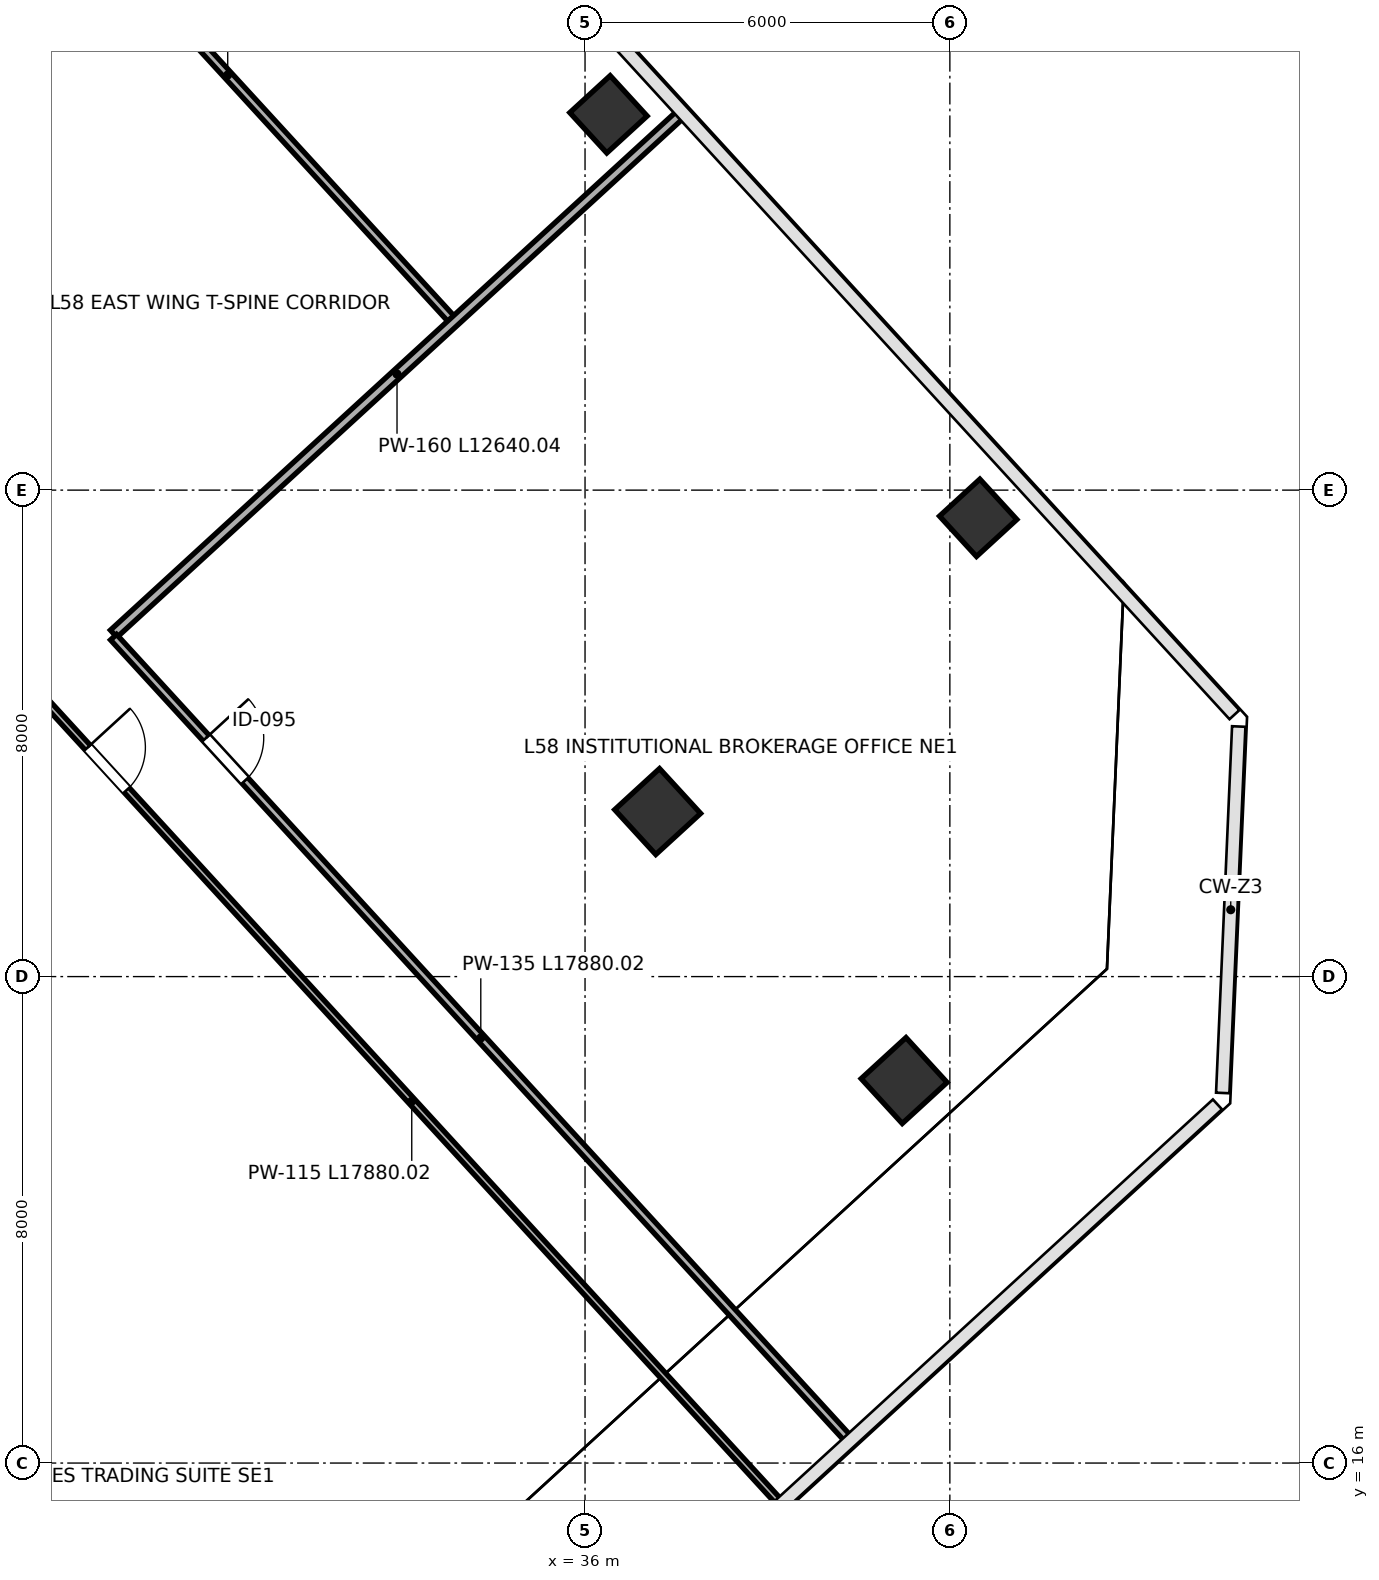
"""IFC4 building model, lengths in metres.
Left out: names, types, materials, properties, quantities, classifications, styles, units other than length and angle.
Written with IfcOpenShell. Run it as: python <this file> out.ifc"""

import sys

from ifc_helpers import new_model, si_unit, direction, frame, frame_2d, origin, origin_2d, place, context, subcontext, project, spatial, rectangle, extrude, source, transform, mapped, element, fill, save


model = new_model("IFC4")
c1 = context("Model", 3, precision=1e-05, world=origin(), true_north=direction((0.0, 1.0)))
c2 = subcontext(c1, "Body", "Model", "MODEL_VIEW")
j1 = project(units=[si_unit("LENGTHUNIT", "METRE"), si_unit("PLANEANGLEUNIT", "RADIAN")], contexts=[c1])
p1 = place(None, origin())
s1 = spatial("IfcSite", under=j1, at=p1, CompositionType="ELEMENT")
p2 = place(p1, origin())
s2 = spatial("IfcBuilding", under=s1, at=p2, CompositionType="ELEMENT")
p3 = place(p2, frame((0.0, 0.0, 258.4)))
s3 = spatial("IfcBuildingStorey", under=s2, at=p3, CompositionType="ELEMENT", Elevation=258.4)
m1 = source(origin(), c2, "Body", "SweptSolid", [
    extrude(rectangle(XDim=0.9, YDim=0.9, at=origin_2d()), origin(), (0.0, 0.0, 1.0), 4.199),
])
p4 = place(p3, frame((36.385, 38.18, 0.001), z_axis=(0.0, 0.0, 1.0), x_axis=(-0.675590207616, 0.73727733681, 0.0)))
e1 = element("IfcColumn", 1, at=p4, inside=s3, PredefinedType="COLUMN", context=c2, shape_type="MappedRepresentation", body=[
    mapped(m1, transform((0.0, 0.0, 0.0), scale=1.0)),
])
m2 = source(origin(), c2, "Body", "SweptSolid", [
    extrude(rectangle(XDim=1.0, YDim=1.0, at=origin_2d()), origin(), (0.0, 0.0, 1.0), 4.199),
])
p5 = place(p3, frame((37.194, 26.714, 0.001), z_axis=(0.0, 0.0, 1.0), x_axis=(-0.675590207616, 0.73727733681, 0.0)))
e2 = element("IfcColumn", 2, at=p5, inside=s3, PredefinedType="COLUMN", context=c2, shape_type="MappedRepresentation", body=[
    mapped(m2, transform((0.0, 0.0, 0.0), scale=1.0)),
])
p6 = place(p3, frame((42.466, 31.545, 0.001), z_axis=(0.0, 0.0, 1.0), x_axis=(-0.675590207616, 0.73727733681, 0.0)))
e3 = element("IfcColumn", 3, at=p6, inside=s3, PredefinedType="COLUMN", context=c2, shape_type="MappedRepresentation", body=[
    mapped(m1, transform((0.0, 0.0, 0.0), scale=1.0)),
])
m3 = source(origin(), c2, "Body", "SweptSolid", [
    extrude(rectangle(XDim=1.0, YDim=1.0, at=origin_2d()), origin(), (0.0, 0.0, 1.0), 4.199),
])
p7 = place(p3, frame((41.248, 22.291, 0.001), z_axis=(0.0, 0.0, 1.0), x_axis=(-0.675590207616, 0.73727733681, 0.0)))
e4 = element("IfcColumn", 4, at=p7, inside=s3, PredefinedType="COLUMN", context=c2, shape_type="MappedRepresentation", body=[
    mapped(m3, transform((0.0, 0.0, 0.0), scale=1.0)),
])
p8 = place(p3, frame((19.042, 50.92, 0.0), z_axis=(0.0, 0.0, 1.0), x_axis=(0.675589646996, -0.737277850523, 0.0)))
e5 = element("IfcWall", 5, at=p8, inside=s3, PredefinedType="PARTITIONING", context=c2, shape_type="SweptSolid", body=[
    extrude(rectangle(XDim=21.87, YDim=0.135, at=frame_2d((10.935, 0.0))), origin(), (0.0, 0.0, 1.0), 3.96),
])
p9 = place(p8, frame((5.4, 0.0, 0.0)))
e6 = element("IfcOpeningElement", 6, at=p9, cuts=e5, PredefinedType="OPENING", context=c2, shape_type="SweptSolid", body=[
    extrude(rectangle(XDim=0.95, YDim=2.15, at=frame_2d((0.475, 1.075))), frame((0.0, 0.078, 0.0), z_axis=(0.0, -1.0, 0.0), x_axis=(1.0, 0.0, 0.0)), (0.0, 0.0, 1.0), 0.155),
])
p10 = place(p8, frame((9.4, 0.0, 0.0)))
e7 = element("IfcOpeningElement", 7, at=p10, cuts=e5, PredefinedType="OPENING", context=c2, shape_type="SweptSolid", body=[
    extrude(rectangle(XDim=0.95, YDim=2.15, at=frame_2d((0.475, 1.075))), frame((0.0, 0.078, 0.0), z_axis=(0.0, -1.0, 0.0), x_axis=(1.0, 0.0, 0.0)), (0.0, 0.0, 1.0), 0.155),
])
p11 = place(p3, frame((28.248, 29.639, 0.0), z_axis=(0.0, 0.0, 1.0), x_axis=(0.73728000412, 0.675587296746, 0.0)))
e8 = element("IfcWall", 8, at=p11, inside=s3, PredefinedType="PARTITIONING", context=c2, shape_type="SweptSolid", body=[
    extrude(rectangle(XDim=12.64, YDim=0.16, at=frame_2d((6.32, 0.0))), origin(), (0.0, 0.0, 1.0), 3.295),
])
p12 = place(p3, frame((28.246, 29.582, 0.0), z_axis=(0.0, 0.0, 1.0), x_axis=(0.67559539026, -0.737272587758, 0.0)))
e9 = element("IfcWall", 9, at=p12, inside=s3, PredefinedType="PARTITIONING", context=c2, shape_type="SweptSolid", body=[
    extrude(rectangle(XDim=17.88, YDim=0.135, at=frame_2d((8.94, 0.0))), origin(), (0.0, 0.0, 1.0), 3.253),
])
p13 = place(p12, frame((2.25, 0.0, 0.0)))
e10 = element("IfcOpeningElement", 10, at=p13, cuts=e9, PredefinedType="OPENING", context=c2, shape_type="SweptSolid", body=[
    extrude(rectangle(XDim=0.95, YDim=2.15, at=frame_2d((0.475, 1.075))), frame((0.0, 0.078, 0.0), z_axis=(0.0, -1.0, 0.0), x_axis=(1.0, 0.0, 0.0)), (0.0, 0.0, 1.0), 0.155),
])
p14 = place(p3, frame((27.11, 28.542, 0.0), z_axis=(0.0, 0.0, 1.0), x_axis=(0.675588589041, -0.737278819957, 0.0)))
e11 = element("IfcWall", 11, at=p14, inside=s3, PredefinedType="PARTITIONING", context=c2, shape_type="SweptSolid", body=[
    extrude(rectangle(XDim=17.88, YDim=0.115, at=frame_2d((8.94, 0.0))), origin(), (0.0, 0.0, 1.0), 3.253),
])
p15 = place(p14, frame((1.05, 0.0, 0.0)))
e12 = element("IfcOpeningElement", 12, at=p15, cuts=e11, PredefinedType="OPENING", context=c2, shape_type="SweptSolid", body=[
    extrude(rectangle(XDim=0.95, YDim=2.15, at=frame_2d((0.475, 1.075))), frame((0.0, 0.067, 0.0), z_axis=(0.0, -1.0, 0.0), x_axis=(1.0, 0.0, 0.0)), (0.0, 0.0, 1.0), 0.135),
])
m4 = source(origin(), c2, "Body", "SweptSolid", [
    extrude(rectangle(XDim=0.95, YDim=2.15, at=frame_2d((0.475, 1.075))), frame((0.0, 0.025, 0.0), z_axis=(0.0, -1.0, 0.0), x_axis=(1.0, 0.0, 0.0)), (0.0, 0.0, 1.0), 0.05),
])
p16 = place(p13, origin())
e13 = element("IfcDoor", 13, at=p16, inside=s3, OperationType="SINGLE_SWING_LEFT", PredefinedType="DOOR", context=c2, shape_type="MappedRepresentation", body=[
    mapped(m4, transform((0.0, 0.0, 0.0), scale=1.0)),
])
fill(e10, e13)
p17 = place(p15, origin())
e14 = element("IfcDoor", 14, at=p17, inside=s3, OperationType="SINGLE_SWING_LEFT", PredefinedType="DOOR", context=c2, shape_type="MappedRepresentation", body=[
    mapped(m4, transform((0.0, 0.0, 0.0), scale=1.0)),
])
fill(e12, e14)
save(model, sys.argv[1])
